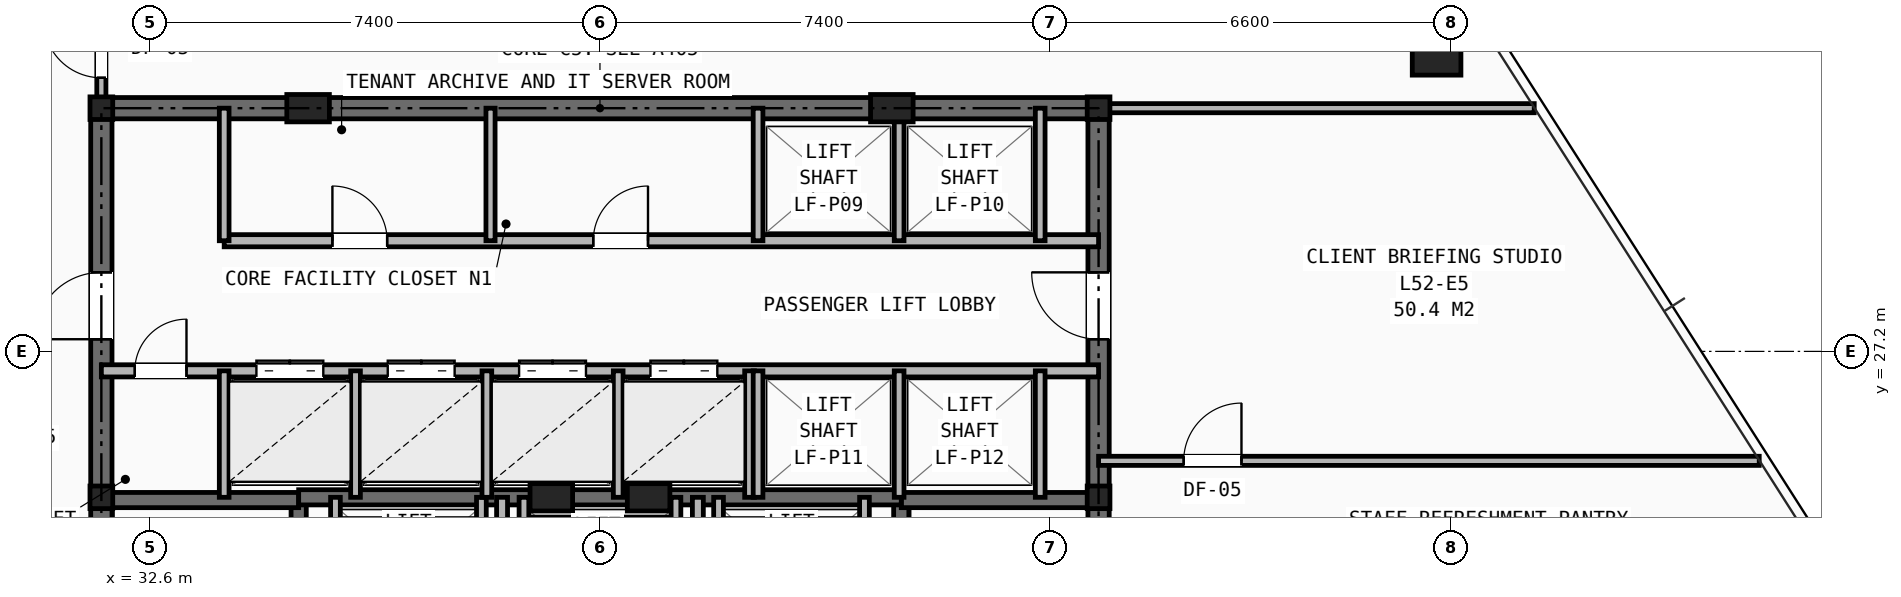
"""IFC4 building model, lengths in metres.
Left out: names, types, materials, properties, quantities, classifications, styles, units other than length and angle.
Written with IfcOpenShell. Run it as: python <this file> out.ifc"""

import sys

from ifc_helpers import new_model, si_unit, direction, frame, frame_2d, origin, origin_2d, place, context, subcontext, project, spatial, rectangle, hollow_rectangle, i_section, extrude, element, fill, save


model = new_model("IFC4")
c1 = context("Model", 3, precision=1e-05, world=origin(), true_north=direction((0.0, 1.0)))
c2 = subcontext(c1, "Body", "Model", "MODEL_VIEW")
j1 = project(units=[si_unit("LENGTHUNIT", "METRE"), si_unit("PLANEANGLEUNIT", "RADIAN")], contexts=[c1])
p1 = place(None, origin())
s1 = spatial("IfcSite", under=j1, at=p1, CompositionType="ELEMENT")
p2 = place(p1, origin())
s2 = spatial("IfcBuilding", under=s1, at=p2, CompositionType="ELEMENT")
p3 = place(p2, frame((0.0, 0.0, 182.7)))
s3 = spatial("IfcBuildingStorey", under=s2, at=p3, CompositionType="ELEMENT", Elevation=182.7)
for number, where, z_axis, x_axis in (
    (1, (31.8, 24.8, 0.0), (0.0, 0.0, 1.0), (1.0, 0.0, 0.0)),
    (2, (48.2, 24.8, 0.0), (0.0, 0.0, 1.0), (1.0, 0.0, 0.0)),
    (3, (31.8, 31.2, 0.0), (0.0, 0.0, 1.0), (1.0, 0.0, 0.0)),
    (4, (48.2, 31.2, 0.0), (0.0, 0.0, 1.0), (1.0, 0.0, 0.0)),
):
    element("IfcColumn", number, at=place(p3, frame(where, z_axis=z_axis, x_axis=x_axis)), inside=s3, PredefinedType="COLUMN", context=c2, shape_type="SweptSolid", body=[
        extrude(i_section(OverallWidth=0.374, OverallDepth=0.372, WebThickness=0.016, FlangeThickness=0.026, at=origin_2d()), origin(), (0.0, 0.0, 1.0), 3.45),
    ])
for number, where, z_axis, x_axis in (
    (5, (35.2, 31.2, 0.0), (0.0, 0.0, 1.0), (1.0, 0.0, 0.0)),
    (6, (44.8, 31.2, 0.0), (0.0, 0.0, 1.0), (1.0, 0.0, 0.0)),
    (7, (39.2, 24.8, 0.0), (0.0, 0.0, 1.0), (1.0, 0.0, 0.0)),
    (8, (40.8, 24.8, 0.0), (0.0, 0.0, 1.0), (1.0, 0.0, 0.0)),
):
    element("IfcColumn", number, at=place(p3, frame(where, z_axis=z_axis, x_axis=x_axis)), inside=s3, PredefinedType="PILASTER", context=c2, shape_type="SweptSolid", body=[
        extrude(rectangle(XDim=0.7, YDim=0.45, at=origin_2d()), origin(), (0.0, 0.0, 1.0), 3.45),
    ])
p4 = place(p3, frame((53.759, 32.144, 0.0), z_axis=(0.0, 0.0, 1.0), x_axis=(1.0, 0.0, 0.0)))
e9 = element("IfcColumn", 9, at=p4, inside=s3, PredefinedType="COLUMN", context=c2, shape_type="SweptSolid", body=[
    extrude(hollow_rectangle(XDim=0.8, YDim=0.8, WallThickness=0.055, at=origin_2d()), origin(), (0.0, 0.0, 1.0), 3.45),
])
p5 = place(p3, frame((31.8, 31.2, 0.0), z_axis=(0.0, 0.0, 1.0), x_axis=(1.0, 0.0, 0.0)))
e10 = element("IfcWall", 10, at=p5, inside=s3, PredefinedType="SHEAR", context=c2, shape_type="SweptSolid", body=[
    extrude(rectangle(XDim=16.4, YDim=0.35, at=frame_2d((8.2, 0.0))), origin(), (0.0, 0.0, 1.0), 3.21),
])
p6 = place(p3, frame((31.8, 16.4, 0.0), z_axis=(0.0, 0.0, 1.0), x_axis=(0.0, 1.0, 0.0)))
e11 = element("IfcWall", 11, at=p6, inside=s3, PredefinedType="SHEAR", context=c2, shape_type="SweptSolid", body=[
    extrude(rectangle(XDim=14.8, YDim=0.35, at=frame_2d((7.4, 0.0))), origin(), (0.0, 0.0, 1.0), 3.21),
])
p7 = place(p6, frame((11.0, 0.0, 0.0)))
e12 = element("IfcOpeningElement", 12, at=p7, cuts=e11, PredefinedType="OPENING", context=c2, shape_type="SweptSolid", body=[
    extrude(rectangle(XDim=1.1, YDim=2.15, at=frame_2d((0.55, 1.075))), frame((0.0, 0.185, 0.0), z_axis=(0.0, -1.0, 0.0), x_axis=(1.0, 0.0, 0.0)), (0.0, 0.0, 1.0), 0.37),
])
p8 = place(p3, frame((48.2, 16.4, 0.0), z_axis=(0.0, 0.0, 1.0), x_axis=(0.0, 1.0, 0.0)))
e13 = element("IfcWall", 13, at=p8, inside=s3, PredefinedType="SHEAR", context=c2, shape_type="SweptSolid", body=[
    extrude(rectangle(XDim=14.8, YDim=0.35, at=frame_2d((7.4, 0.0))), origin(), (0.0, 0.0, 1.0), 3.21),
])
p9 = place(p8, frame((11.0, 0.0, 0.0)))
e14 = element("IfcOpeningElement", 14, at=p9, cuts=e13, PredefinedType="OPENING", context=c2, shape_type="SweptSolid", body=[
    extrude(rectangle(XDim=1.1, YDim=2.15, at=frame_2d((0.55, 1.075))), frame((0.0, 0.185, 0.0), z_axis=(0.0, -1.0, 0.0), x_axis=(1.0, 0.0, 0.0)), (0.0, 0.0, 1.0), 0.37),
])
p10 = place(p3, frame((35.045, 16.4, 0.0), z_axis=(0.0, 0.0, 1.0), x_axis=(0.0, 1.0, 0.0)))
e15 = element("IfcWall", 15, at=p10, inside=s3, PredefinedType="SHEAR", context=c2, shape_type="SweptSolid", body=[
    extrude(rectangle(XDim=8.4, YDim=0.25, at=frame_2d((4.2, 0.0))), origin(), (0.0, 0.0, 1.0), 3.21),
])
p11 = place(p10, frame((0.45, 0.0, 0.0)))
e16 = element("IfcOpeningElement", 16, at=p11, cuts=e15, PredefinedType="OPENING", context=c2, shape_type="SweptSolid", body=[
    extrude(rectangle(XDim=0.95, YDim=2.1, at=frame_2d((0.475, 1.05))), frame((0.0, 0.135, 0.0), z_axis=(0.0, -1.0, 0.0), x_axis=(1.0, 0.0, 0.0)), (0.0, 0.0, 1.0), 0.27),
])
p12 = place(p3, frame((31.8, 24.755, 0.0), z_axis=(0.0, 0.0, 1.0), x_axis=(1.0, 0.0, 0.0)))
e17 = element("IfcWall", 17, at=p12, inside=s3, PredefinedType="SHEAR", context=c2, shape_type="SweptSolid", body=[
    extrude(rectangle(XDim=3.245, YDim=0.25, at=frame_2d((1.623, 0.0))), origin(), (0.0, 0.0, 1.0), 3.21),
])
p13 = place(p3, frame((44.955, 16.4, 0.0), z_axis=(0.0, 0.0, 1.0), x_axis=(0.0, 1.0, 0.0)))
e18 = element("IfcWall", 18, at=p13, inside=s3, PredefinedType="SHEAR", context=c2, shape_type="SweptSolid", body=[
    extrude(rectangle(XDim=8.4, YDim=0.25, at=frame_2d((4.2, 0.0))), origin(), (0.0, 0.0, 1.0), 3.21),
])
p14 = place(p13, frame((0.45, 0.0, 0.0)))
e19 = element("IfcOpeningElement", 19, at=p14, cuts=e18, PredefinedType="OPENING", context=c2, shape_type="SweptSolid", body=[
    extrude(rectangle(XDim=0.95, YDim=2.1, at=frame_2d((0.475, 1.05))), frame((0.0, 0.135, 0.0), z_axis=(0.0, -1.0, 0.0), x_axis=(1.0, 0.0, 0.0)), (0.0, 0.0, 1.0), 0.27),
])
p15 = place(p3, frame((44.955, 24.755, 0.0), z_axis=(0.0, 0.0, 1.0), x_axis=(1.0, 0.0, 0.0)))
e20 = element("IfcWall", 20, at=p15, inside=s3, PredefinedType="SHEAR", context=c2, shape_type="SweptSolid", body=[
    extrude(rectangle(XDim=3.245, YDim=0.25, at=frame_2d((1.623, 0.0))), origin(), (0.0, 0.0, 1.0), 3.21),
])
p16 = place(p3, frame((35.045, 24.8, 0.0), z_axis=(0.0, 0.0, 1.0), x_axis=(1.0, 0.0, 0.0)))
e21 = element("IfcWall", 21, at=p16, inside=s3, PredefinedType="SHEAR", context=c2, shape_type="SweptSolid", body=[
    extrude(rectangle(XDim=9.91, YDim=0.25, at=frame_2d((4.955, 0.0))), origin(), (0.0, 0.0, 1.0), 3.21),
])
p17 = place(p3, frame((38.39, 16.4, 0.0), z_axis=(0.0, 0.0, 1.0), x_axis=(0.0, 1.0, 0.0)))
e22 = element("IfcWall", 22, at=p17, inside=s3, PredefinedType="PARTITIONING", context=c2, shape_type="SweptSolid", body=[
    extrude(rectangle(XDim=8.4, YDim=0.18, at=frame_2d((4.2, 0.0))), origin(), (0.0, 0.0, 1.0), 2.665),
])
p18 = place(p17, frame((3.85, 0.0, 0.0)))
e23 = element("IfcOpeningElement", 23, at=p18, cuts=e22, PredefinedType="OPENING", context=c2, shape_type="SweptSolid", body=[
    extrude(rectangle(XDim=0.95, YDim=2.1, at=frame_2d((0.475, 1.05))), frame((0.0, 0.1, 0.0), z_axis=(0.0, -1.0, 0.0), x_axis=(1.0, 0.0, 0.0)), (0.0, 0.0, 1.0), 0.2),
])
p19 = place(p3, frame((41.61, 16.4, 0.0), z_axis=(0.0, 0.0, 1.0), x_axis=(0.0, 1.0, 0.0)))
e24 = element("IfcWall", 24, at=p19, inside=s3, PredefinedType="PARTITIONING", context=c2, shape_type="SweptSolid", body=[
    extrude(rectangle(XDim=8.4, YDim=0.18, at=frame_2d((4.2, 0.0))), origin(), (0.0, 0.0, 1.0), 2.665),
])
for number, where, z_axis, x_axis in (
    (25, (35.65, 22.48, 0.0), (0.0, 0.0, 1.0), (0.0, 1.0, 0.0)),
    (26, (38.05, 22.48, 0.0), (0.0, 0.0, 1.0), (0.0, 1.0, 0.0)),
    (27, (41.95, 22.48, 0.0), (0.0, 0.0, 1.0), (0.0, 1.0, 0.0)),
    (28, (44.35, 22.48, 0.0), (0.0, 0.0, 1.0), (0.0, 1.0, 0.0)),
    (29, (38.75, 22.48, 0.0), (0.0, 0.0, 1.0), (0.0, 1.0, 0.0)),
    (30, (41.25, 22.48, 0.0), (0.0, 0.0, 1.0), (0.0, 1.0, 0.0)),
):
    element("IfcWall", number, at=place(p3, frame(where, z_axis=z_axis, x_axis=x_axis)), inside=s3, PredefinedType="SOLIDWALL", context=c2, shape_type="SweptSolid", body=[
        extrude(rectangle(XDim=2.32, YDim=0.16, at=frame_2d((1.16, 0.0))), origin(), (0.0, 0.0, 1.0), 3.21),
    ])
p20 = place(p3, frame((33.82, 29.02, 0.0), z_axis=(0.0, 0.0, 1.0), x_axis=(1.0, 0.0, 0.0)))
e31 = element("IfcWall", 31, at=p20, inside=s3, PredefinedType="SOLIDWALL", context=c2, shape_type="SweptSolid", body=[
    extrude(rectangle(XDim=14.38, YDim=0.2, at=frame_2d((7.19, 0.0))), origin(), (0.0, 0.0, 1.0), 2.665),
])
p21 = place(p20, frame((1.78, 0.0, 0.0)))
e32 = element("IfcOpeningElement", 32, at=p21, cuts=e31, PredefinedType="OPENING", context=c2, shape_type="SweptSolid", body=[
    extrude(rectangle(XDim=0.9, YDim=2.1, at=frame_2d((0.45, 1.05))), frame((0.0, 0.11, 0.0), z_axis=(0.0, -1.0, 0.0), x_axis=(1.0, 0.0, 0.0)), (0.0, 0.0, 1.0), 0.22),
])
p22 = place(p20, frame((6.07, 0.0, 0.0)))
e33 = element("IfcOpeningElement", 33, at=p22, cuts=e31, PredefinedType="OPENING", context=c2, shape_type="SweptSolid", body=[
    extrude(rectangle(XDim=0.9, YDim=2.1, at=frame_2d((0.45, 1.05))), frame((0.0, 0.11, 0.0), z_axis=(0.0, -1.0, 0.0), x_axis=(1.0, 0.0, 0.0)), (0.0, 0.0, 1.0), 0.22),
])
p23 = place(p3, frame((31.8, 26.88, 0.0), z_axis=(0.0, 0.0, 1.0), x_axis=(1.0, 0.0, 0.0)))
e34 = element("IfcWall", 34, at=p23, inside=s3, PredefinedType="SOLIDWALL", context=c2, shape_type="SweptSolid", body=[
    extrude(rectangle(XDim=16.4, YDim=0.2, at=frame_2d((8.2, 0.0))), origin(), (0.0, 0.0, 1.0), 2.665),
])
p24 = place(p23, frame((0.55, 0.0, 0.0)))
e35 = element("IfcOpeningElement", 35, at=p24, cuts=e34, PredefinedType="OPENING", context=c2, shape_type="SweptSolid", body=[
    extrude(rectangle(XDim=0.85, YDim=2.05, at=frame_2d((0.425, 1.025))), frame((0.0, 0.11, 0.0), z_axis=(0.0, -1.0, 0.0), x_axis=(1.0, 0.0, 0.0)), (0.0, 0.0, 1.0), 0.22),
])
p25 = place(p23, frame((2.55, 0.0, 0.0)))
e36 = element("IfcOpeningElement", 36, at=p25, cuts=e34, PredefinedType="OPENING", context=c2, shape_type="SweptSolid", body=[
    extrude(rectangle(XDim=1.1, YDim=2.15, at=frame_2d((0.55, 1.075))), frame((0.0, 0.11, 0.0), z_axis=(0.0, -1.0, 0.0), x_axis=(1.0, 0.0, 0.0)), (0.0, 0.0, 1.0), 0.22),
])
p26 = place(p23, frame((4.71, 0.0, 0.0)))
e37 = element("IfcOpeningElement", 37, at=p26, cuts=e34, PredefinedType="OPENING", context=c2, shape_type="SweptSolid", body=[
    extrude(rectangle(XDim=1.1, YDim=2.15, at=frame_2d((0.55, 1.075))), frame((0.0, 0.11, 0.0), z_axis=(0.0, -1.0, 0.0), x_axis=(1.0, 0.0, 0.0)), (0.0, 0.0, 1.0), 0.22),
])
p27 = place(p23, frame((6.87, 0.0, 0.0)))
e38 = element("IfcOpeningElement", 38, at=p27, cuts=e34, PredefinedType="OPENING", context=c2, shape_type="SweptSolid", body=[
    extrude(rectangle(XDim=1.1, YDim=2.15, at=frame_2d((0.55, 1.075))), frame((0.0, 0.11, 0.0), z_axis=(0.0, -1.0, 0.0), x_axis=(1.0, 0.0, 0.0)), (0.0, 0.0, 1.0), 0.22),
])
p28 = place(p23, frame((9.03, 0.0, 0.0)))
e39 = element("IfcOpeningElement", 39, at=p28, cuts=e34, PredefinedType="OPENING", context=c2, shape_type="SweptSolid", body=[
    extrude(rectangle(XDim=1.1, YDim=2.15, at=frame_2d((0.55, 1.075))), frame((0.0, 0.11, 0.0), z_axis=(0.0, -1.0, 0.0), x_axis=(1.0, 0.0, 0.0)), (0.0, 0.0, 1.0), 0.22),
])
p29 = place(p3, frame((33.82, 29.02, 0.0), z_axis=(0.0, 0.0, 1.0), x_axis=(0.0, 1.0, 0.0)))
e40 = element("IfcWall", 40, at=p29, inside=s3, PredefinedType="SOLIDWALL", context=c2, shape_type="SweptSolid", body=[
    extrude(rectangle(XDim=2.18, YDim=0.16, at=frame_2d((1.09, 0.0))), origin(), (0.0, 0.0, 1.0), 2.665),
])
p30 = place(p3, frame((33.82, 24.8, 0.0), z_axis=(0.0, 0.0, 1.0), x_axis=(0.0, 1.0, 0.0)))
e41 = element("IfcWall", 41, at=p30, inside=s3, PredefinedType="SOLIDWALL", context=c2, shape_type="SweptSolid", body=[
    extrude(rectangle(XDim=2.08, YDim=0.16, at=frame_2d((1.04, 0.0))), origin(), (0.0, 0.0, 1.0), 3.21),
])
p31 = place(p3, frame((38.2, 29.02, 0.0), z_axis=(0.0, 0.0, 1.0), x_axis=(0.0, 1.0, 0.0)))
e42 = element("IfcWall", 42, at=p31, inside=s3, PredefinedType="PARTITIONING", context=c2, shape_type="SweptSolid", body=[
    extrude(rectangle(XDim=2.18, YDim=0.15, at=frame_2d((1.09, 0.0))), origin(), (0.0, 0.0, 1.0), 2.665),
])
for number, where, z_axis, x_axis in (
    (43, (35.98, 24.8, 0.0), (0.0, 0.0, 1.0), (0.0, 1.0, 0.0)),
    (44, (38.14, 24.8, 0.0), (0.0, 0.0, 1.0), (0.0, 1.0, 0.0)),
    (45, (40.3, 24.8, 0.0), (0.0, 0.0, 1.0), (0.0, 1.0, 0.0)),
    (46, (42.46, 24.8, 0.0), (0.0, 0.0, 1.0), (0.0, 1.0, 0.0)),
):
    element("IfcWall", number, at=place(p3, frame(where, z_axis=z_axis, x_axis=x_axis)), inside=s3, PredefinedType="SOLIDWALL", context=c2, shape_type="SweptSolid", body=[
        extrude(rectangle(XDim=2.08, YDim=0.16, at=frame_2d((1.04, 0.0))), origin(), (0.0, 0.0, 1.0), 3.21),
    ])
for number, where, z_axis, x_axis in (
    (47, (42.6, 29.02, 0.0), (0.0, 0.0, 1.0), (0.0, 1.0, 0.0)),
    (48, (44.92, 29.02, 0.0), (0.0, 0.0, 1.0), (0.0, 1.0, 0.0)),
    (49, (47.24, 29.02, 0.0), (0.0, 0.0, 1.0), (0.0, 1.0, 0.0)),
):
    element("IfcWall", number, at=place(p3, frame(where, z_axis=z_axis, x_axis=x_axis)), inside=s3, PredefinedType="SOLIDWALL", context=c2, shape_type="SweptSolid", body=[
        extrude(rectangle(XDim=2.18, YDim=0.16, at=frame_2d((1.09, 0.0))), origin(), (0.0, 0.0, 1.0), 2.665),
    ])
for number, where, z_axis, x_axis in (
    (50, (42.6, 24.8, 0.0), (0.0, 0.0, 1.0), (0.0, 1.0, 0.0)),
    (51, (44.92, 24.8, 0.0), (0.0, 0.0, 1.0), (0.0, 1.0, 0.0)),
    (52, (47.24, 24.8, 0.0), (0.0, 0.0, 1.0), (0.0, 1.0, 0.0)),
):
    element("IfcWall", number, at=place(p3, frame(where, z_axis=z_axis, x_axis=x_axis)), inside=s3, PredefinedType="SOLIDWALL", context=c2, shape_type="SweptSolid", body=[
        extrude(rectangle(XDim=2.08, YDim=0.16, at=frame_2d((1.04, 0.0))), origin(), (0.0, 0.0, 1.0), 3.21),
    ])
p32 = place(p3, frame((31.8, 31.2, 0.0), z_axis=(0.0, 0.0, 1.0), x_axis=(0.0, 1.0, 0.0)))
e53 = element("IfcWall", 53, at=p32, inside=s3, PredefinedType="PARTITIONING", context=c2, shape_type="SweptSolid", body=[
    extrude(rectangle(XDim=5.3, YDim=0.15, at=frame_2d((2.65, 0.0))), origin(), (0.0, 0.0, 1.0), 2.252),
])
p33 = place(p32, frame((0.5, 0.0, 0.0)))
e54 = element("IfcOpeningElement", 54, at=p33, cuts=e53, PredefinedType="OPENING", context=c2, shape_type="SweptSolid", body=[
    extrude(rectangle(XDim=0.95, YDim=2.1, at=frame_2d((0.475, 1.05))), frame((0.0, 0.085, 0.0), z_axis=(0.0, -1.0, 0.0), x_axis=(1.0, 0.0, 0.0)), (0.0, 0.0, 1.0), 0.17),
])
p34 = place(p3, frame((48.2, 31.2, 0.0), z_axis=(0.0, 0.0, 1.0), x_axis=(1.0, 0.0, 0.0)))
e55 = element("IfcWall", 55, at=p34, inside=s3, PredefinedType="PARTITIONING", context=c2, shape_type="SweptSolid", body=[
    extrude(rectangle(XDim=7.165, YDim=0.15, at=frame_2d((3.582, 0.0))), origin(), (0.0, 0.0, 1.0), 2.252),
])
p35 = place(p3, frame((48.2, 25.4, 0.0), z_axis=(0.0, 0.0, 1.0), x_axis=(1.0, 0.0, 0.0)))
e56 = element("IfcWall", 56, at=p35, inside=s3, PredefinedType="PARTITIONING", context=c2, shape_type="SweptSolid", body=[
    extrude(rectangle(XDim=10.865, YDim=0.15, at=frame_2d((5.433, 0.0))), origin(), (0.0, 0.0, 1.0), 2.589),
])
p36 = place(p35, frame((1.4, 0.0, 0.0)))
e57 = element("IfcOpeningElement", 57, at=p36, cuts=e56, PredefinedType="OPENING", context=c2, shape_type="SweptSolid", body=[
    extrude(rectangle(XDim=0.95, YDim=2.1, at=frame_2d((0.475, 1.05))), frame((0.0, 0.085, 0.0), z_axis=(0.0, -1.0, 0.0), x_axis=(1.0, 0.0, 0.0)), (0.0, 0.0, 1.0), 0.17),
])
p37 = place(p24, origin())
e58 = element("IfcDoor", 58, at=p37, inside=s3, OperationType="SINGLE_SWING_RIGHT", PredefinedType="DOOR", context=c2, shape_type="SweptSolid", body=[
    extrude(rectangle(XDim=0.85, YDim=2.05, at=frame_2d((0.425, 1.025))), frame((0.0, 0.025, 0.0), z_axis=(0.0, -1.0, 0.0), x_axis=(1.0, 0.0, 0.0)), (0.0, 0.0, 1.0), 0.05),
])
fill(e35, e58)
p38 = place(p7, origin())
e59 = element("IfcDoor", 59, at=p38, inside=s3, OperationType="SINGLE_SWING_LEFT", PredefinedType="DOOR", context=c2, shape_type="SweptSolid", body=[
    extrude(rectangle(XDim=1.1, YDim=2.15, at=frame_2d((0.55, 1.075))), frame((0.0, 0.025, 0.0), z_axis=(0.0, -1.0, 0.0), x_axis=(1.0, 0.0, 0.0)), (0.0, 0.0, 1.0), 0.05),
])
fill(e12, e59)
p39 = place(p9, origin())
e60 = element("IfcDoor", 60, at=p39, inside=s3, OperationType="SINGLE_SWING_RIGHT", PredefinedType="DOOR", context=c2, shape_type="SweptSolid", body=[
    extrude(rectangle(XDim=1.1, YDim=2.15, at=frame_2d((0.55, 1.075))), frame((0.0, 0.025, 0.0), z_axis=(0.0, -1.0, 0.0), x_axis=(1.0, 0.0, 0.0)), (0.0, 0.0, 1.0), 0.05),
])
fill(e14, e60)
p40 = place(p21, origin())
e61 = element("IfcDoor", 61, at=p40, inside=s3, OperationType="SINGLE_SWING_LEFT", PredefinedType="DOOR", context=c2, shape_type="SweptSolid", body=[
    extrude(rectangle(XDim=0.9, YDim=2.1, at=frame_2d((0.45, 1.05))), frame((0.0, 0.025, 0.0), z_axis=(0.0, -1.0, 0.0), x_axis=(1.0, 0.0, 0.0)), (0.0, 0.0, 1.0), 0.05),
])
fill(e32, e61)
p41 = place(p22, origin())
e62 = element("IfcDoor", 62, at=p41, inside=s3, OperationType="SINGLE_SWING_RIGHT", PredefinedType="DOOR", context=c2, shape_type="SweptSolid", body=[
    extrude(rectangle(XDim=0.9, YDim=2.1, at=frame_2d((0.45, 1.05))), frame((0.0, 0.025, 0.0), z_axis=(0.0, -1.0, 0.0), x_axis=(1.0, 0.0, 0.0)), (0.0, 0.0, 1.0), 0.05),
])
fill(e33, e62)
p42 = place(p25, origin())
e63 = element("IfcDoor", 63, at=p42, inside=s3, OperationType="DOUBLE_DOOR_SLIDING", PredefinedType="DOOR", context=c2, shape_type="SweptSolid", body=[
    extrude(rectangle(XDim=1.1, YDim=2.15, at=frame_2d((0.55, 1.075))), frame((0.0, 0.025, 0.0), z_axis=(0.0, -1.0, 0.0), x_axis=(1.0, 0.0, 0.0)), (0.0, 0.0, 1.0), 0.05),
])
fill(e36, e63)
p43 = place(p26, origin())
e64 = element("IfcDoor", 64, at=p43, inside=s3, OperationType="DOUBLE_DOOR_SLIDING", PredefinedType="DOOR", context=c2, shape_type="SweptSolid", body=[
    extrude(rectangle(XDim=1.1, YDim=2.15, at=frame_2d((0.55, 1.075))), frame((0.0, 0.025, 0.0), z_axis=(0.0, -1.0, 0.0), x_axis=(1.0, 0.0, 0.0)), (0.0, 0.0, 1.0), 0.05),
])
fill(e37, e64)
p44 = place(p27, origin())
e65 = element("IfcDoor", 65, at=p44, inside=s3, OperationType="DOUBLE_DOOR_SLIDING", PredefinedType="DOOR", context=c2, shape_type="SweptSolid", body=[
    extrude(rectangle(XDim=1.1, YDim=2.15, at=frame_2d((0.55, 1.075))), frame((0.0, 0.025, 0.0), z_axis=(0.0, -1.0, 0.0), x_axis=(1.0, 0.0, 0.0)), (0.0, 0.0, 1.0), 0.05),
])
fill(e38, e65)
p45 = place(p28, origin())
e66 = element("IfcDoor", 66, at=p45, inside=s3, OperationType="DOUBLE_DOOR_SLIDING", PredefinedType="DOOR", context=c2, shape_type="SweptSolid", body=[
    extrude(rectangle(XDim=1.1, YDim=2.15, at=frame_2d((0.55, 1.075))), frame((0.0, 0.025, 0.0), z_axis=(0.0, -1.0, 0.0), x_axis=(1.0, 0.0, 0.0)), (0.0, 0.0, 1.0), 0.05),
])
fill(e39, e66)
p46 = place(p33, origin())
e67 = element("IfcDoor", 67, at=p46, inside=s3, OperationType="SINGLE_SWING_RIGHT", PredefinedType="DOOR", context=c2, shape_type="SweptSolid", body=[
    extrude(rectangle(XDim=0.95, YDim=2.1, at=frame_2d((0.475, 1.05))), frame((0.0, 0.025, 0.0), z_axis=(0.0, -1.0, 0.0), x_axis=(1.0, 0.0, 0.0)), (0.0, 0.0, 1.0), 0.05),
])
fill(e54, e67)
p47 = place(p36, origin())
e68 = element("IfcDoor", 68, at=p47, inside=s3, OperationType="SINGLE_SWING_RIGHT", PredefinedType="DOOR", context=c2, shape_type="SweptSolid", body=[
    extrude(rectangle(XDim=0.95, YDim=2.1, at=frame_2d((0.475, 1.05))), frame((0.0, 0.025, 0.0), z_axis=(0.0, -1.0, 0.0), x_axis=(1.0, 0.0, 0.0)), (0.0, 0.0, 1.0), 0.05),
])
fill(e57, e68)
save(model, sys.argv[1])
